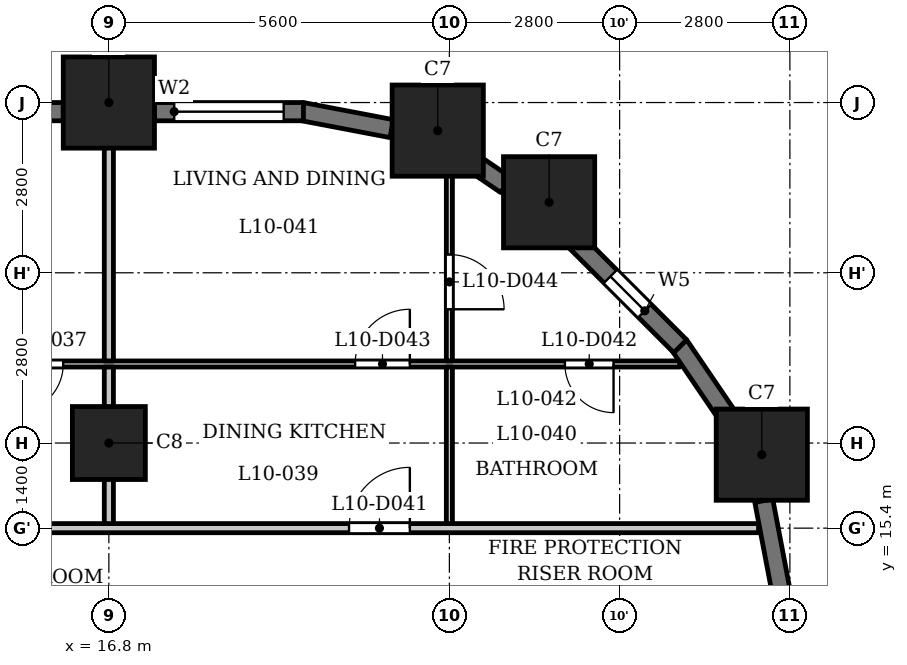
"""IFC4 building model, lengths in metres.
Left out: names, types, materials, properties, quantities, classifications, styles, units other than length and angle.
Written with IfcOpenShell. Run it as: python <this file> out.ifc"""

import sys

from ifc_helpers import new_model, si_unit, direction, frame, frame_2d, origin, origin_2d, place, context, subcontext, project, spatial, rectangle, extrude, element, fill, save


model = new_model("IFC4")
c1 = context("Model", 3, precision=1e-05, world=origin(), true_north=direction((0.0, 1.0)))
c2 = subcontext(c1, "Body", "Model", "MODEL_VIEW")
j1 = project(units=[si_unit("LENGTHUNIT", "METRE"), si_unit("PLANEANGLEUNIT", "RADIAN")], contexts=[c1])
p1 = place(None, origin())
s1 = spatial("IfcSite", under=j1, at=p1, CompositionType="ELEMENT")
p2 = place(p1, origin())
s2 = spatial("IfcBuilding", under=s1, at=p2, CompositionType="ELEMENT")
p3 = place(p2, frame((0.0, 0.0, 44.5)))
s3 = spatial("IfcBuildingStorey", under=s2, at=p3, CompositionType="ELEMENT", Elevation=44.5)
for number, where, z_axis, x_axis in (
    (1, (27.538, 16.609, 0.0), (0.0, 0.0, 1.0), (1.0, 0.0, 0.0)),
    (2, (24.04, 20.76, 0.0), (0.0, 0.0, 1.0), (1.0, 0.0, 0.0)),
    (3, (22.209, 21.938, 0.0), (0.0, 0.0, 1.0), (1.0, 0.0, 0.0)),
    (4, (16.8, 22.4, 0.0), (0.0, 0.0, 1.0), (1.0, 0.0, 0.0)),
):
    element("IfcColumn", number, at=place(p3, frame(where, z_axis=z_axis, x_axis=x_axis)), inside=s3, PredefinedType="COLUMN", context=c2, shape_type="SweptSolid", body=[
        extrude(rectangle(XDim=1.5, YDim=1.5, at=origin_2d()), origin(), (0.0, 0.0, 1.0), 3.5),
    ])
p4 = place(p3, frame((16.8, 16.8, 0.0), z_axis=(0.0, 0.0, 1.0), x_axis=(1.0, 0.0, 0.0)))
e5 = element("IfcColumn", 5, at=p4, inside=s3, PredefinedType="COLUMN", context=c2, shape_type="SweptSolid", body=[
    extrude(rectangle(XDim=1.2, YDim=1.2, at=origin_2d()), origin(), (0.0, 0.0, 1.0), 3.5),
])
for number, where, z_axis, x_axis in (
    (6, (27.853, 14.372, 0.0), (0.0, 0.0, 1.0), (-0.187, 0.982, 0.0)),
    (7, (27.025, 17.167, 0.0), (0.0, 0.0, 1.0), (-0.562, 0.827, 0.0)),
):
    element("IfcWall", number, at=place(p3, frame(where, z_axis=z_axis, x_axis=x_axis)), inside=s3, PredefinedType="SOLIDWALL", context=c2, shape_type="SweptSolid", body=[
        extrude(rectangle(XDim=1.506, YDim=0.3, at=frame_2d((0.753, 0.0))), origin(), (0.0, 0.0, 1.0), 2.35),
    ])
p5 = place(p3, frame((26.197, 18.391, 0.0), z_axis=(0.0, 0.0, 1.0), x_axis=(-0.707106781187, 0.707106781187, 0.0)))
e8 = element("IfcWall", 8, at=p5, inside=s3, PredefinedType="SOLIDWALL", context=c2, shape_type="SweptSolid", body=[
    extrude(rectangle(XDim=2.45, YDim=0.3, at=frame_2d((1.225, 0.0))), origin(), (0.0, 0.0, 1.0), 2.35),
])
p6 = place(p5, frame((0.825, 0.0, 0.6)))
e9 = element("IfcOpeningElement", 9, at=p6, cuts=e8, PredefinedType="OPENING", context=c2, shape_type="SweptSolid", body=[
    extrude(rectangle(XDim=0.8, YDim=1.55, at=frame_2d((0.4, 0.775))), frame((0.0, 0.16, 0.0), z_axis=(0.0, -1.0, 0.0), x_axis=(1.0, 0.0, 0.0)), (0.0, 0.0, 1.0), 0.32),
])
p7 = place(p3, frame((23.327, 21.045, 0.0), z_axis=(0.0, 0.0, 1.0), x_axis=(-0.827080706709, 0.562083182981, 0.0)))
e10 = element("IfcWall", 10, at=p7, inside=s3, PredefinedType="SOLIDWALL", context=c2, shape_type="SweptSolid", body=[
    extrude(rectangle(XDim=0.677, YDim=0.3, at=frame_2d((0.339, 0.0))), origin(), (0.0, 0.0, 1.0), 3.2),
])
p8 = place(p3, frame((21.451, 21.97, 0.0), z_axis=(0.0, 0.0, 1.0), x_axis=(-0.982287454367, 0.187380247071, 0.0)))
e11 = element("IfcWall", 11, at=p8, inside=s3, PredefinedType="SOLIDWALL", context=c2, shape_type="SweptSolid", body=[
    extrude(rectangle(XDim=1.506, YDim=0.3, at=frame_2d((0.753, 0.0))), origin(), (0.0, 0.0, 1.0), 2.35),
])
p9 = place(p3, frame((20.0, 22.25, 0.0), z_axis=(0.0, 0.0, 1.0), x_axis=(-1.0, 0.0, 0.0)))
e12 = element("IfcWall", 12, at=p9, inside=s3, PredefinedType="SOLIDWALL", context=c2, shape_type="SweptSolid", body=[
    extrude(rectangle(XDim=2.45, YDim=0.3, at=frame_2d((1.225, 0.0))), origin(), (0.0, 0.0, 1.0), 2.35),
])
p10 = place(p9, frame((0.325, 0.0, 0.9)))
e13 = element("IfcOpeningElement", 13, at=p10, cuts=e12, PredefinedType="OPENING", context=c2, shape_type="SweptSolid", body=[
    extrude(rectangle(XDim=1.8, YDim=1.25, at=frame_2d((0.9, 0.625))), frame((0.0, 0.16, 0.0), z_axis=(0.0, -1.0, 0.0), x_axis=(1.0, 0.0, 0.0)), (0.0, 0.0, 1.0), 0.32),
])
p11 = place(p3, frame((16.05, 22.25, 0.0), z_axis=(0.0, 0.0, 1.0), x_axis=(-1.0, 0.0, 0.0)))
e14 = element("IfcWall", 14, at=p11, inside=s3, PredefinedType="SOLIDWALL", context=c2, shape_type="SweptSolid", body=[
    extrude(rectangle(XDim=4.1, YDim=0.3, at=frame_2d((2.05, 0.0))), origin(), (0.0, 0.0, 1.0), 2.35),
])
p12 = place(p11, frame((0.25, 0.0, 1.2)))
e15 = element("IfcOpeningElement", 15, at=p12, cuts=e14, PredefinedType="OPENING", context=c2, shape_type="SweptSolid", body=[
    extrude(rectangle(XDim=3.6, YDim=0.95, at=frame_2d((1.8, 0.475))), frame((0.0, 0.16, 0.0), z_axis=(0.0, -1.0, 0.0), x_axis=(1.0, 0.0, 0.0)), (0.0, 0.0, 1.0), 0.32),
])
p13 = place(p3, frame((-27.484, 15.4, 0.0), z_axis=(0.0, 0.0, 1.0), x_axis=(1.0, 0.0, 0.0)))
e16 = element("IfcWall", 16, at=p13, inside=s3, PredefinedType="PARTITIONING", context=c2, shape_type="SweptSolid", body=[
    extrude(rectangle(XDim=54.968, YDim=0.15, at=frame_2d((27.484, 0.0))), origin(), (0.0, 0.0, 1.0), 3.2),
])
p14 = place(p13, frame((8.784, 0.0, 0.0)))
e17 = element("IfcOpeningElement", 17, at=p14, cuts=e16, PredefinedType="OPENING", context=c2, shape_type="SweptSolid", body=[
    extrude(rectangle(XDim=1.0, YDim=2.1, at=frame_2d((0.5, 1.05))), frame((0.0, 0.085, 0.0), z_axis=(0.0, -1.0, 0.0), x_axis=(1.0, 0.0, 0.0)), (0.0, 0.0, 1.0), 0.17),
])
p15 = place(p13, frame((14.634, 0.0, 0.0)))
e18 = element("IfcOpeningElement", 18, at=p15, cuts=e16, PredefinedType="OPENING", context=c2, shape_type="SweptSolid", body=[
    extrude(rectangle(XDim=1.0, YDim=2.1, at=frame_2d((0.5, 1.05))), frame((0.0, 0.085, 0.0), z_axis=(0.0, -1.0, 0.0), x_axis=(1.0, 0.0, 0.0)), (0.0, 0.0, 1.0), 0.17),
])
p16 = place(p13, frame((25.834, 0.0, 0.0)))
e19 = element("IfcOpeningElement", 19, at=p16, cuts=e16, PredefinedType="OPENING", context=c2, shape_type="SweptSolid", body=[
    extrude(rectangle(XDim=1.0, YDim=2.1, at=frame_2d((0.5, 1.05))), frame((0.0, 0.085, 0.0), z_axis=(0.0, -1.0, 0.0), x_axis=(1.0, 0.0, 0.0)), (0.0, 0.0, 1.0), 0.17),
])
p17 = place(p13, frame((30.184, 0.0, 0.0)))
e20 = element("IfcOpeningElement", 20, at=p17, cuts=e16, PredefinedType="OPENING", context=c2, shape_type="SweptSolid", body=[
    extrude(rectangle(XDim=1.0, YDim=2.1, at=frame_2d((0.5, 1.05))), frame((0.0, 0.085, 0.0), z_axis=(0.0, -1.0, 0.0), x_axis=(1.0, 0.0, 0.0)), (0.0, 0.0, 1.0), 0.17),
])
p18 = place(p13, frame((37.034, 0.0, 0.0)))
e21 = element("IfcOpeningElement", 21, at=p18, cuts=e16, PredefinedType="OPENING", context=c2, shape_type="SweptSolid", body=[
    extrude(rectangle(XDim=1.0, YDim=2.1, at=frame_2d((0.5, 1.05))), frame((0.0, 0.085, 0.0), z_axis=(0.0, -1.0, 0.0), x_axis=(1.0, 0.0, 0.0)), (0.0, 0.0, 1.0), 0.17),
])
p19 = place(p13, frame((48.234, 0.0, 0.0)))
e22 = element("IfcOpeningElement", 22, at=p19, cuts=e16, PredefinedType="OPENING", context=c2, shape_type="SweptSolid", body=[
    extrude(rectangle(XDim=1.0, YDim=2.1, at=frame_2d((0.5, 1.05))), frame((0.0, 0.085, 0.0), z_axis=(0.0, -1.0, 0.0), x_axis=(1.0, 0.0, 0.0)), (0.0, 0.0, 1.0), 0.17),
])
p20 = place(p3, frame((-26.44, 18.1, 0.0), z_axis=(0.0, 0.0, 1.0), x_axis=(1.0, 0.0, 0.0)))
e23 = element("IfcWall", 23, at=p20, inside=s3, PredefinedType="PARTITIONING", context=c2, shape_type="SweptSolid", body=[
    extrude(rectangle(XDim=52.63, YDim=0.1, at=frame_2d((26.315, 0.0))), origin(), (0.0, 0.0, 1.0), 3.2),
])
p21 = place(p20, frame((2.626, 0.0, 0.0)))
e24 = element("IfcOpeningElement", 24, at=p21, cuts=e23, PredefinedType="OPENING", context=c2, shape_type="SweptSolid", body=[
    extrude(rectangle(XDim=0.8, YDim=2.1, at=frame_2d((0.4, 1.05))), frame((0.0, 0.06, 0.0), z_axis=(0.0, -1.0, 0.0), x_axis=(1.0, 0.0, 0.0)), (0.0, 0.0, 1.0), 0.12),
])
p22 = place(p20, frame((7.84, 0.0, 0.0)))
e25 = element("IfcOpeningElement", 25, at=p22, cuts=e23, PredefinedType="OPENING", context=c2, shape_type="SweptSolid", body=[
    extrude(rectangle(XDim=0.9, YDim=2.1, at=frame_2d((0.45, 1.05))), frame((0.0, 0.06, 0.0), z_axis=(0.0, -1.0, 0.0), x_axis=(1.0, 0.0, 0.0)), (0.0, 0.0, 1.0), 0.12),
])
p23 = place(p20, frame((18.49, 0.0, 0.0)))
e26 = element("IfcOpeningElement", 26, at=p23, cuts=e23, PredefinedType="OPENING", context=c2, shape_type="SweptSolid", body=[
    extrude(rectangle(XDim=0.8, YDim=2.1, at=frame_2d((0.4, 1.05))), frame((0.0, 0.06, 0.0), z_axis=(0.0, -1.0, 0.0), x_axis=(1.0, 0.0, 0.0)), (0.0, 0.0, 1.0), 0.12),
])
p24 = place(p20, frame((16.54, 0.0, 0.0)))
e27 = element("IfcOpeningElement", 27, at=p24, cuts=e23, PredefinedType="OPENING", context=c2, shape_type="SweptSolid", body=[
    extrude(rectangle(XDim=0.9, YDim=2.1, at=frame_2d((0.45, 1.05))), frame((0.0, 0.06, 0.0), z_axis=(0.0, -1.0, 0.0), x_axis=(1.0, 0.0, 0.0)), (0.0, 0.0, 1.0), 0.12),
])
p25 = place(p20, frame((10.89, 0.0, 0.0)))
e28 = element("IfcOpeningElement", 28, at=p25, cuts=e23, PredefinedType="OPENING", context=c2, shape_type="SweptSolid", body=[
    extrude(rectangle(XDim=0.9, YDim=2.1, at=frame_2d((0.45, 1.05))), frame((0.0, 0.06, 0.0), z_axis=(0.0, -1.0, 0.0), x_axis=(1.0, 0.0, 0.0)), (0.0, 0.0, 1.0), 0.12),
])
p26 = place(p20, frame((12.94, 0.0, 0.0)))
e29 = element("IfcOpeningElement", 29, at=p26, cuts=e23, PredefinedType="OPENING", context=c2, shape_type="SweptSolid", body=[
    extrude(rectangle(XDim=0.9, YDim=2.1, at=frame_2d((0.45, 1.05))), frame((0.0, 0.06, 0.0), z_axis=(0.0, -1.0, 0.0), x_axis=(1.0, 0.0, 0.0)), (0.0, 0.0, 1.0), 0.12),
])
p27 = place(p20, frame((21.49, 0.0, 0.0)))
e30 = element("IfcOpeningElement", 30, at=p27, cuts=e23, PredefinedType="OPENING", context=c2, shape_type="SweptSolid", body=[
    extrude(rectangle(XDim=0.8, YDim=2.1, at=frame_2d((0.4, 1.05))), frame((0.0, 0.06, 0.0), z_axis=(0.0, -1.0, 0.0), x_axis=(1.0, 0.0, 0.0)), (0.0, 0.0, 1.0), 0.12),
])
p28 = place(p20, frame((24.89, 0.0, 0.0)))
e31 = element("IfcOpeningElement", 31, at=p28, cuts=e23, PredefinedType="OPENING", context=c2, shape_type="SweptSolid", body=[
    extrude(rectangle(XDim=0.9, YDim=2.1, at=frame_2d((0.45, 1.05))), frame((0.0, 0.06, 0.0), z_axis=(0.0, -1.0, 0.0), x_axis=(1.0, 0.0, 0.0)), (0.0, 0.0, 1.0), 0.12),
])
p29 = place(p20, frame((27.09, 0.0, 0.0)))
e32 = element("IfcOpeningElement", 32, at=p29, cuts=e23, PredefinedType="OPENING", context=c2, shape_type="SweptSolid", body=[
    extrude(rectangle(XDim=0.8, YDim=2.1, at=frame_2d((0.4, 1.05))), frame((0.0, 0.06, 0.0), z_axis=(0.0, -1.0, 0.0), x_axis=(1.0, 0.0, 0.0)), (0.0, 0.0, 1.0), 0.12),
])
p30 = place(p20, frame((28.99, 0.0, 0.0)))
e33 = element("IfcOpeningElement", 33, at=p30, cuts=e23, PredefinedType="OPENING", context=c2, shape_type="SweptSolid", body=[
    extrude(rectangle(XDim=0.9, YDim=2.1, at=frame_2d((0.45, 1.05))), frame((0.0, 0.06, 0.0), z_axis=(0.0, -1.0, 0.0), x_axis=(1.0, 0.0, 0.0)), (0.0, 0.0, 1.0), 0.12),
])
p31 = place(p20, frame((41.69, 0.0, 0.0)))
e34 = element("IfcOpeningElement", 34, at=p31, cuts=e23, PredefinedType="OPENING", context=c2, shape_type="SweptSolid", body=[
    extrude(rectangle(XDim=0.8, YDim=2.1, at=frame_2d((0.4, 1.05))), frame((0.0, 0.06, 0.0), z_axis=(0.0, -1.0, 0.0), x_axis=(1.0, 0.0, 0.0)), (0.0, 0.0, 1.0), 0.12),
])
p32 = place(p20, frame((38.99, 0.0, 0.0)))
e35 = element("IfcOpeningElement", 35, at=p32, cuts=e23, PredefinedType="OPENING", context=c2, shape_type="SweptSolid", body=[
    extrude(rectangle(XDim=0.9, YDim=2.1, at=frame_2d((0.45, 1.05))), frame((0.0, 0.06, 0.0), z_axis=(0.0, -1.0, 0.0), x_axis=(1.0, 0.0, 0.0)), (0.0, 0.0, 1.0), 0.12),
])
p33 = place(p20, frame((33.29, 0.0, 0.0)))
e36 = element("IfcOpeningElement", 36, at=p33, cuts=e23, PredefinedType="OPENING", context=c2, shape_type="SweptSolid", body=[
    extrude(rectangle(XDim=0.9, YDim=2.1, at=frame_2d((0.45, 1.05))), frame((0.0, 0.06, 0.0), z_axis=(0.0, -1.0, 0.0), x_axis=(1.0, 0.0, 0.0)), (0.0, 0.0, 1.0), 0.12),
])
p34 = place(p20, frame((35.34, 0.0, 0.0)))
e37 = element("IfcOpeningElement", 37, at=p34, cuts=e23, PredefinedType="OPENING", context=c2, shape_type="SweptSolid", body=[
    extrude(rectangle(XDim=0.9, YDim=2.1, at=frame_2d((0.45, 1.05))), frame((0.0, 0.06, 0.0), z_axis=(0.0, -1.0, 0.0), x_axis=(1.0, 0.0, 0.0)), (0.0, 0.0, 1.0), 0.12),
])
p35 = place(p20, frame((50.74, 0.0, 0.0)))
e38 = element("IfcOpeningElement", 38, at=p35, cuts=e23, PredefinedType="OPENING", context=c2, shape_type="SweptSolid", body=[
    extrude(rectangle(XDim=0.8, YDim=2.1, at=frame_2d((0.4, 1.05))), frame((0.0, 0.06, 0.0), z_axis=(0.0, -1.0, 0.0), x_axis=(1.0, 0.0, 0.0)), (0.0, 0.0, 1.0), 0.12),
])
p36 = place(p20, frame((47.29, 0.0, 0.0)))
e39 = element("IfcOpeningElement", 39, at=p36, cuts=e23, PredefinedType="OPENING", context=c2, shape_type="SweptSolid", body=[
    extrude(rectangle(XDim=0.9, YDim=2.1, at=frame_2d((0.45, 1.05))), frame((0.0, 0.06, 0.0), z_axis=(0.0, -1.0, 0.0), x_axis=(1.0, 0.0, 0.0)), (0.0, 0.0, 1.0), 0.12),
])
p37 = place(p3, frame((16.8, 15.475, 0.0), z_axis=(0.0, 0.0, 1.0), x_axis=(0.0, 1.0, 0.0)))
e40 = element("IfcWall", 40, at=p37, inside=s3, PredefinedType="PARTITIONING", context=c2, shape_type="SweptSolid", body=[
    extrude(rectangle(XDim=2.575, YDim=0.15, at=frame_2d((1.288, 0.0))), origin(), (0.0, 0.0, 1.0), 3.2),
])
p38 = place(p3, frame((16.8, 18.15, 0.0), z_axis=(0.0, 0.0, 1.0), x_axis=(0.0, 1.0, 0.0)))
e41 = element("IfcWall", 41, at=p38, inside=s3, PredefinedType="PARTITIONING", context=c2, shape_type="SweptSolid", body=[
    extrude(rectangle(XDim=4.98, YDim=0.15, at=frame_2d((2.49, 0.0))), origin(), (0.0, 0.0, 1.0), 3.2),
])
p39 = place(p3, frame((22.4, 15.475, 0.0), z_axis=(0.0, 0.0, 1.0), x_axis=(0.0, 1.0, 0.0)))
e42 = element("IfcWall", 42, at=p39, inside=s3, PredefinedType="PARTITIONING", context=c2, shape_type="SweptSolid", body=[
    extrude(rectangle(XDim=2.575, YDim=0.1, at=frame_2d((1.288, 0.0))), origin(), (0.0, 0.0, 1.0), 3.2),
])
p40 = place(p3, frame((22.4, 18.15, 0.0), z_axis=(0.0, 0.0, 1.0), x_axis=(0.0, 1.0, 0.0)))
e43 = element("IfcWall", 43, at=p40, inside=s3, PredefinedType="PARTITIONING", context=c2, shape_type="SweptSolid", body=[
    extrude(rectangle(XDim=3.57, YDim=0.1, at=frame_2d((1.785, 0.0))), origin(), (0.0, 0.0, 1.0), 3.2),
])
p41 = place(p40, frame((0.85, 0.0, 0.0)))
e44 = element("IfcOpeningElement", 44, at=p41, cuts=e43, PredefinedType="OPENING", context=c2, shape_type="SweptSolid", body=[
    extrude(rectangle(XDim=0.9, YDim=2.1, at=frame_2d((0.45, 1.05))), frame((0.0, 0.06, 0.0), z_axis=(0.0, -1.0, 0.0), x_axis=(1.0, 0.0, 0.0)), (0.0, 0.0, 1.0), 0.12),
])
p42 = place(p31, origin())
e45 = element("IfcDoor", 45, at=p42, inside=s3, OperationType="SINGLE_SWING_LEFT", PredefinedType="DOOR", context=c2, shape_type="SweptSolid", body=[
    extrude(rectangle(XDim=0.8, YDim=2.1, at=frame_2d((0.4, 1.05))), frame((0.0, 0.025, 0.0), z_axis=(0.0, -1.0, 0.0), x_axis=(1.0, 0.0, 0.0)), (0.0, 0.0, 1.0), 0.05),
])
fill(e34, e45)
p43 = place(p19, origin())
e46 = element("IfcDoor", 46, at=p43, inside=s3, OperationType="SINGLE_SWING_LEFT", PredefinedType="DOOR", context=c2, shape_type="SweptSolid", body=[
    extrude(rectangle(XDim=1.0, YDim=2.1, at=frame_2d((0.5, 1.05))), frame((0.0, 0.025, 0.0), z_axis=(0.0, -1.0, 0.0), x_axis=(1.0, 0.0, 0.0)), (0.0, 0.0, 1.0), 0.05),
])
fill(e22, e46)
p44 = place(p35, origin())
e47 = element("IfcDoor", 47, at=p44, inside=s3, OperationType="SINGLE_SWING_RIGHT", PredefinedType="DOOR", context=c2, shape_type="SweptSolid", body=[
    extrude(rectangle(XDim=0.8, YDim=2.1, at=frame_2d((0.4, 1.05))), frame((0.0, 0.025, 0.0), z_axis=(0.0, -1.0, 0.0), x_axis=(1.0, 0.0, 0.0)), (0.0, 0.0, 1.0), 0.05),
])
fill(e38, e47)
p45 = place(p36, origin())
e48 = element("IfcDoor", 48, at=p45, inside=s3, OperationType="SINGLE_SWING_LEFT", PredefinedType="DOOR", context=c2, shape_type="SweptSolid", body=[
    extrude(rectangle(XDim=0.9, YDim=2.1, at=frame_2d((0.45, 1.05))), frame((0.0, 0.025, 0.0), z_axis=(0.0, -1.0, 0.0), x_axis=(1.0, 0.0, 0.0)), (0.0, 0.0, 1.0), 0.05),
])
fill(e39, e48)
p46 = place(p41, origin())
e49 = element("IfcDoor", 49, at=p46, inside=s3, OperationType="SINGLE_SWING_LEFT", PredefinedType="DOOR", context=c2, shape_type="SweptSolid", body=[
    extrude(rectangle(XDim=0.9, YDim=2.1, at=frame_2d((0.45, 1.05))), frame((0.0, 0.025, 0.0), z_axis=(0.0, -1.0, 0.0), x_axis=(1.0, 0.0, 0.0)), (0.0, 0.0, 1.0), 0.05),
])
fill(e44, e49)
p47 = place(p6, origin())
e50 = element("IfcWindow", 50, at=p47, inside=s3, PartitioningType="SINGLE_PANEL", PredefinedType="WINDOW", context=c2, shape_type="SweptSolid", body=[
    extrude(rectangle(XDim=0.8, YDim=1.55, at=frame_2d((0.4, 0.775))), frame((0.0, 0.03, 0.0), z_axis=(0.0, -1.0, 0.0), x_axis=(1.0, 0.0, 0.0)), (0.0, 0.0, 1.0), 0.06),
])
fill(e9, e50)
p48 = place(p10, origin())
e51 = element("IfcWindow", 51, at=p48, inside=s3, PartitioningType="SINGLE_PANEL", PredefinedType="WINDOW", context=c2, shape_type="SweptSolid", body=[
    extrude(rectangle(XDim=1.8, YDim=1.25, at=frame_2d((0.9, 0.625))), frame((0.0, 0.03, 0.0), z_axis=(0.0, -1.0, 0.0), x_axis=(1.0, 0.0, 0.0)), (0.0, 0.0, 1.0), 0.06),
])
fill(e13, e51)
save(model, sys.argv[1])
